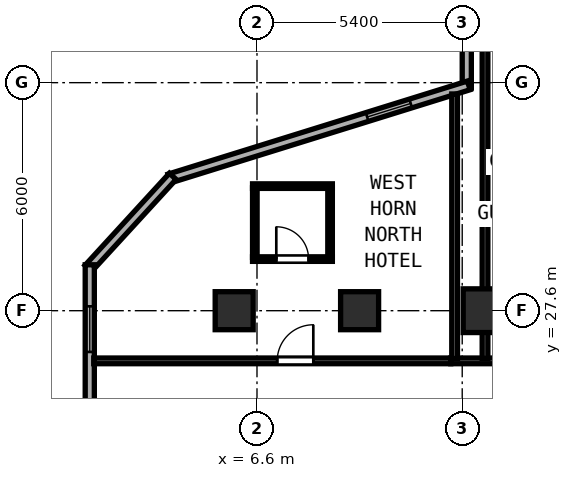
"""IFC4 building model, lengths in metres.
Left out: names, types, materials, properties, quantities, classifications, styles, units other than length and angle.
Written with IfcOpenShell. Run it as: python <this file> out.ifc"""

import sys

from ifc_helpers import new_model, si_unit, direction, frame, frame_2d, origin, origin_2d, place, context, subcontext, project, spatial, rectangle, hollow_rectangle, extrude, element, fill, save


model = new_model("IFC4")
c1 = context("Model", 3, precision=1e-05, world=origin(), true_north=direction((0.0, 1.0)))
c2 = subcontext(c1, "Body", "Model", "MODEL_VIEW")
j1 = project(units=[si_unit("LENGTHUNIT", "METRE"), si_unit("PLANEANGLEUNIT", "RADIAN")], contexts=[c1])
p1 = place(None, origin())
s1 = spatial("IfcSite", under=j1, at=p1, CompositionType="ELEMENT")
p2 = place(p1, origin())
s2 = spatial("IfcBuilding", under=s1, at=p2, CompositionType="ELEMENT")
p3 = place(p2, frame((0.0, 0.0, 47.6)))
s3 = spatial("IfcBuildingStorey", under=s2, at=p3, CompositionType="ELEMENT", Elevation=47.6)
p4 = place(p3, frame((12.6, 27.6, 0.0), z_axis=(0.0, 0.0, 1.0), x_axis=(1.0, 0.0, 0.0)))
e1 = element("IfcColumn", 1, at=p4, inside=s3, PredefinedType="COLUMN", context=c2, shape_type="SweptSolid", body=[
    extrude(hollow_rectangle(XDim=1.15, YDim=1.15, WallThickness=0.042, at=origin_2d()), origin(), (0.0, 0.0, 1.0), 3.8),
])
for number, where, z_axis, x_axis in (
    (2, (6.0, 27.6, 0.0), (0.0, 0.0, 1.0), (1.0, 0.0, 0.0)),
    (3, (9.3, 27.6, 0.0), (0.0, 0.0, 1.0), (1.0, 0.0, 0.0)),
):
    element("IfcColumn", number, at=place(p3, frame(where, z_axis=z_axis, x_axis=x_axis)), inside=s3, PredefinedType="COLUMN", context=c2, shape_type="SweptSolid", body=[
        extrude(hollow_rectangle(XDim=1.0, YDim=1.0, WallThickness=0.038, at=origin_2d()), origin(), (0.0, 0.0, 1.0), 3.8),
    ])
p5 = place(p3, frame((12.12, 37.535, 0.0), z_axis=(0.0, 0.0, 1.0), x_axis=(0.0, -1.0, 0.0)))
e4 = element("IfcWall", 4, at=p5, inside=s3, PredefinedType="SOLIDWALL", context=c2, shape_type="SweptSolid", body=[
    extrude(rectangle(XDim=4.078, YDim=0.24, at=frame_2d((2.039, 0.0))), origin(), (0.0, 0.0, 1.0), 3.6),
])
p6 = place(p5, frame((1.6, 0.0, 0.85)))
e5 = element("IfcOpeningElement", 5, at=p6, cuts=e4, PredefinedType="OPENING", context=c2, shape_type="SweptSolid", body=[
    extrude(rectangle(XDim=1.2, YDim=1.85, at=frame_2d((0.6, 0.925))), frame((0.0, 0.13, 0.0), z_axis=(0.0, -1.0, 0.0), x_axis=(1.0, 0.0, 0.0)), (0.0, 0.0, 1.0), 0.26),
])
p7 = place(p3, frame((12.173, 33.528, 0.0), z_axis=(0.0, 0.0, 1.0), x_axis=(-0.954920174609, -0.296862695745, 0.0)))
e6 = element("IfcWall", 6, at=p7, inside=s3, PredefinedType="SOLIDWALL", context=c2, shape_type="SweptSolid", body=[
    extrude(rectangle(XDim=8.25, YDim=0.24, at=frame_2d((4.125, 0.0))), origin(), (0.0, 0.0, 1.0), 3.6),
])
p8 = place(p7, frame((1.6, 0.0, 0.85)))
e7 = element("IfcOpeningElement", 7, at=p8, cuts=e6, PredefinedType="OPENING", context=c2, shape_type="SweptSolid", body=[
    extrude(rectangle(XDim=1.2, YDim=1.85, at=frame_2d((0.6, 0.925))), frame((0.0, 0.13, 0.0), z_axis=(0.0, -1.0, 0.0), x_axis=(1.0, 0.0, 0.0)), (0.0, 0.0, 1.0), 0.26),
])
p9 = place(p3, frame((4.384, 31.135, 0.0), z_axis=(0.0, 0.0, 1.0), x_axis=(-0.675761629512, -0.737120220913, 0.0)))
e8 = element("IfcWall", 8, at=p9, inside=s3, PredefinedType="SOLIDWALL", context=c2, shape_type="SweptSolid", body=[
    extrude(rectangle(XDim=3.287, YDim=0.24, at=frame_2d((1.643, 0.0))), origin(), (0.0, 0.0, 1.0), 3.6),
])
p10 = place(p3, frame((2.2, 28.808, 0.0), z_axis=(0.0, 0.0, 1.0), x_axis=(0.0, -1.0, 0.0)))
e9 = element("IfcWall", 9, at=p10, inside=s3, PredefinedType="SOLIDWALL", context=c2, shape_type="SweptSolid", body=[
    extrude(rectangle(XDim=20.547, YDim=0.24, at=frame_2d((10.274, 0.0))), origin(), (0.0, 0.0, 1.0), 3.6),
])
p11 = place(p10, frame((1.093, 0.0, 0.85)))
e10 = element("IfcOpeningElement", 10, at=p11, cuts=e9, PredefinedType="OPENING", context=c2, shape_type="SweptSolid", body=[
    extrude(rectangle(XDim=1.2, YDim=1.85, at=frame_2d((0.6, 0.925))), frame((0.0, 0.13, 0.0), z_axis=(0.0, -1.0, 0.0), x_axis=(1.0, 0.0, 0.0)), (0.0, 0.0, 1.0), 0.26),
])
p12 = place(p10, frame((7.0, 0.0, 0.85)))
e11 = element("IfcOpeningElement", 11, at=p12, cuts=e9, PredefinedType="OPENING", context=c2, shape_type="SweptSolid", body=[
    extrude(rectangle(XDim=1.2, YDim=1.85, at=frame_2d((0.6, 0.925))), frame((0.0, 0.13, 0.0), z_axis=(0.0, -1.0, 0.0), x_axis=(1.0, 0.0, 0.0)), (0.0, 0.0, 1.0), 0.26),
])
p13 = place(p10, frame((12.4, 0.0, 0.85)))
e12 = element("IfcOpeningElement", 12, at=p13, cuts=e9, PredefinedType="OPENING", context=c2, shape_type="SweptSolid", body=[
    extrude(rectangle(XDim=1.2, YDim=1.85, at=frame_2d((0.6, 0.925))), frame((0.0, 0.13, 0.0), z_axis=(0.0, -1.0, 0.0), x_axis=(1.0, 0.0, 0.0)), (0.0, 0.0, 1.0), 0.26),
])
p14 = place(p10, frame((17.8, 0.0, 0.85)))
e13 = element("IfcOpeningElement", 13, at=p14, cuts=e9, PredefinedType="OPENING", context=c2, shape_type="SweptSolid", body=[
    extrude(rectangle(XDim=1.2, YDim=1.85, at=frame_2d((0.6, 0.925))), frame((0.0, 0.13, 0.0), z_axis=(0.0, -1.0, 0.0), x_axis=(1.0, 0.0, 0.0)), (0.0, 0.0, 1.0), 0.26),
])
p15 = place(p3, frame((11.7, 26.28, 0.0), z_axis=(0.0, 0.0, 1.0), x_axis=(1.0, 0.0, 0.0)))
e14 = element("IfcWall", 14, at=p15, inside=s3, PredefinedType="PARTITIONING", context=c2, shape_type="SweptSolid", body=[
    extrude(rectangle(XDim=4.35, YDim=0.15, at=frame_2d((2.175, 0.0))), origin(), (0.0, 0.0, 1.0), 3.6),
])
p16 = place(p15, frame((3.13, 0.0, 0.0)))
e15 = element("IfcOpeningElement", 15, at=p16, cuts=e14, PredefinedType="OPENING", context=c2, shape_type="SweptSolid", body=[
    extrude(rectangle(XDim=0.95, YDim=2.15, at=frame_2d((0.475, 1.075))), frame((0.0, 0.085, 0.0), z_axis=(0.0, -1.0, 0.0), x_axis=(1.0, 0.0, 0.0)), (0.0, 0.0, 1.0), 0.17),
])
p17 = place(p3, frame((11.8, 26.34, 0.0), z_axis=(0.0, 0.0, 1.0), x_axis=(0.0, 1.0, 0.0)))
e16 = element("IfcWall", 16, at=p17, inside=s3, PredefinedType="PARTITIONING", context=c2, shape_type="SweptSolid", body=[
    extrude(rectangle(XDim=6.962, YDim=0.15, at=frame_2d((3.481, 0.0))), origin(), (0.0, 0.0, 1.0), 3.6),
])
p18 = place(p3, frame((2.305, 26.28, 0.0), z_axis=(0.0, 0.0, 1.0), x_axis=(1.0, 0.0, 0.0)))
e17 = element("IfcWall", 17, at=p18, inside=s3, PredefinedType="PARTITIONING", context=c2, shape_type="SweptSolid", body=[
    extrude(rectangle(XDim=9.393, YDim=0.15, at=frame_2d((4.697, 0.0))), origin(), (0.0, 0.0, 1.0), 3.6),
])
p19 = place(p18, frame((4.827, 0.0, 0.0)))
e18 = element("IfcOpeningElement", 18, at=p19, cuts=e17, PredefinedType="OPENING", context=c2, shape_type="SweptSolid", body=[
    extrude(rectangle(XDim=0.95, YDim=2.15, at=frame_2d((0.475, 1.075))), frame((0.0, 0.085, 0.0), z_axis=(0.0, -1.0, 0.0), x_axis=(1.0, 0.0, 0.0)), (0.0, 0.0, 1.0), 0.17),
])
p20 = place(p3, frame((12.6, 26.34, 0.0), z_axis=(0.0, 0.0, 1.0), x_axis=(0.0, 1.0, 0.0)))
e19 = element("IfcWall", 19, at=p20, inside=s3, PredefinedType="PARTITIONING", context=c2, shape_type="SweptSolid", body=[
    extrude(rectangle(XDim=8.36, YDim=0.15, at=frame_2d((4.18, 0.0))), origin(), (0.0, 0.0, 1.0), 3.097),
])
p21 = place(p3, frame((6.483, 30.878, 0.0), z_axis=(0.0, 0.0, 1.0), x_axis=(1.0, 0.0, 0.0)))
e20 = element("IfcWall", 20, at=p21, inside=s3, PredefinedType="PARTITIONING", context=c2, shape_type="SweptSolid", body=[
    extrude(rectangle(XDim=2.1, YDim=0.12, at=frame_2d((1.05, 0.0))), origin(), (0.0, 0.0, 1.0), 3.6),
])
p22 = place(p3, frame((6.483, 28.958, 0.0), z_axis=(0.0, 0.0, 1.0), x_axis=(1.0, 0.0, 0.0)))
e21 = element("IfcWall", 21, at=p22, inside=s3, PredefinedType="PARTITIONING", context=c2, shape_type="SweptSolid", body=[
    extrude(rectangle(XDim=2.1, YDim=0.12, at=frame_2d((1.05, 0.0))), origin(), (0.0, 0.0, 1.0), 3.6),
])
p23 = place(p22, frame((0.625, 0.0, 0.0)))
e22 = element("IfcOpeningElement", 22, at=p23, cuts=e21, PredefinedType="OPENING", context=c2, shape_type="SweptSolid", body=[
    extrude(rectangle(XDim=0.85, YDim=2.1, at=frame_2d((0.425, 1.05))), frame((0.0, 0.07, 0.0), z_axis=(0.0, -1.0, 0.0), x_axis=(1.0, 0.0, 0.0)), (0.0, 0.0, 1.0), 0.14),
])
for number, where, z_axis, x_axis in (
    (23, (6.543, 29.003, 0.0), (0.0, 0.0, 1.0), (0.0, 1.0, 0.0)),
    (24, (8.523, 29.003, 0.0), (0.0, 0.0, 1.0), (0.0, 1.0, 0.0)),
):
    element("IfcWall", number, at=place(p3, frame(where, z_axis=z_axis, x_axis=x_axis)), inside=s3, PredefinedType="PARTITIONING", context=c2, shape_type="SweptSolid", body=[
        extrude(rectangle(XDim=1.83, YDim=0.12, at=frame_2d((0.915, 0.0))), origin(), (0.0, 0.0, 1.0), 3.6),
    ])
p24 = place(p8, origin())
e25 = element("IfcWindow", 25, at=p24, inside=s3, PartitioningType="SINGLE_PANEL", PredefinedType="WINDOW", context=c2, shape_type="SweptSolid", body=[
    extrude(rectangle(XDim=1.2, YDim=1.85, at=frame_2d((0.6, 0.925))), frame((0.0, 0.03, 0.0), z_axis=(0.0, -1.0, 0.0), x_axis=(1.0, 0.0, 0.0)), (0.0, 0.0, 1.0), 0.06),
])
fill(e7, e25)
p25 = place(p11, origin())
e26 = element("IfcWindow", 26, at=p25, inside=s3, PartitioningType="SINGLE_PANEL", PredefinedType="WINDOW", context=c2, shape_type="SweptSolid", body=[
    extrude(rectangle(XDim=1.2, YDim=1.85, at=frame_2d((0.6, 0.925))), frame((0.0, 0.03, 0.0), z_axis=(0.0, -1.0, 0.0), x_axis=(1.0, 0.0, 0.0)), (0.0, 0.0, 1.0), 0.06),
])
fill(e10, e26)
p26 = place(p19, origin())
e27 = element("IfcDoor", 27, at=p26, inside=s3, OperationType="SINGLE_SWING_RIGHT", PredefinedType="DOOR", context=c2, shape_type="SweptSolid", body=[
    extrude(rectangle(XDim=0.95, YDim=2.15, at=frame_2d((0.475, 1.075))), frame((0.0, 0.025, 0.0), z_axis=(0.0, -1.0, 0.0), x_axis=(1.0, 0.0, 0.0)), (0.0, 0.0, 1.0), 0.05),
])
fill(e18, e27)
p27 = place(p23, origin())
e28 = element("IfcDoor", 28, at=p27, inside=s3, OperationType="SINGLE_SWING_LEFT", PredefinedType="DOOR", context=c2, shape_type="SweptSolid", body=[
    extrude(rectangle(XDim=0.85, YDim=2.1, at=frame_2d((0.425, 1.05))), frame((0.0, 0.025, 0.0), z_axis=(0.0, -1.0, 0.0), x_axis=(1.0, 0.0, 0.0)), (0.0, 0.0, 1.0), 0.05),
])
fill(e22, e28)
save(model, sys.argv[1])
